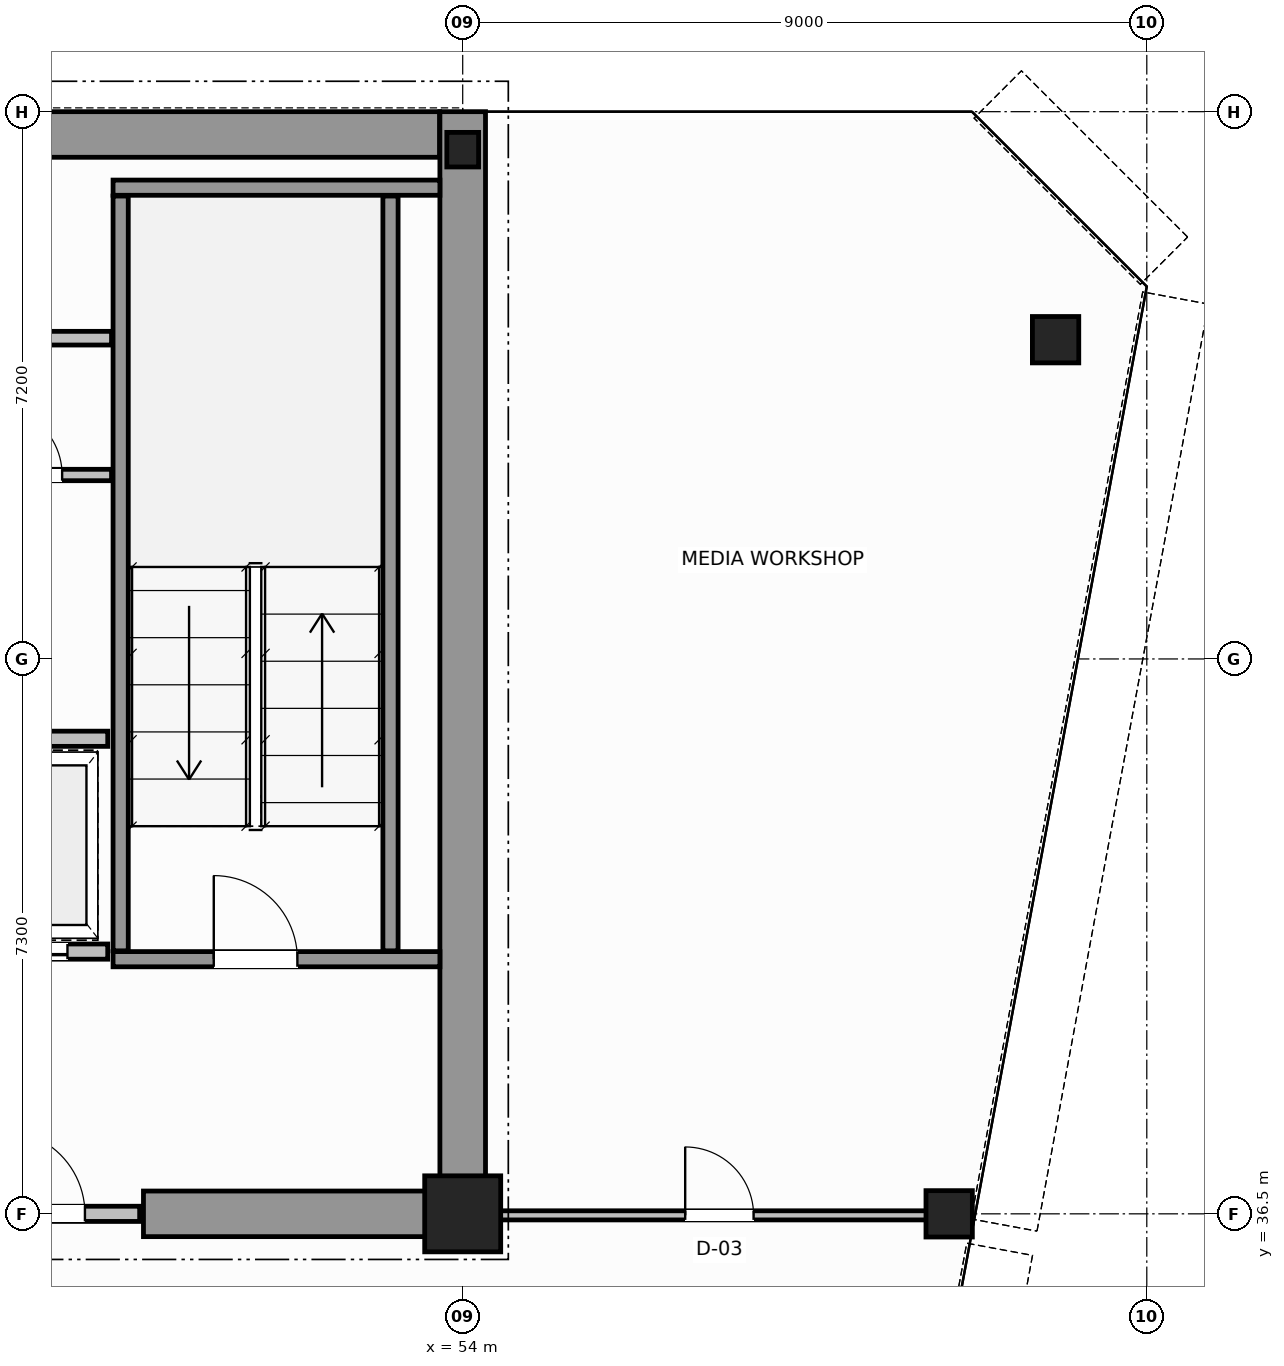
"""IFC4 building model, lengths in metres.
Left out: names, types, materials, properties, quantities, classifications, styles, units other than length and angle.
Written with IfcOpenShell. Run it as: python <this file> out.ifc"""

import sys

from ifc_helpers import new_model, si_unit, direction, frame, frame_2d, origin, origin_2d, place, context, subcontext, project, spatial, rectangle, hollow_circle, i_section, extrude, source, transform, mapped, element, fill, save


model = new_model("IFC4")
c1 = context("Model", 3, precision=1e-05, world=origin(), true_north=direction((0.0, 1.0)))
c2 = subcontext(c1, "Body", "Model", "MODEL_VIEW")
j1 = project(units=[si_unit("LENGTHUNIT", "METRE"), si_unit("PLANEANGLEUNIT", "RADIAN")], contexts=[c1])
p1 = place(None, origin())
s1 = spatial("IfcSite", under=j1, at=p1, CompositionType="ELEMENT")
p2 = place(p1, origin())
s2 = spatial("IfcBuilding", under=s1, at=p2, CompositionType="ELEMENT")
p3 = place(p2, frame((0.0, 0.0, 234.6)))
s3 = spatial("IfcBuildingStorey", under=s2, at=p3, CompositionType="ELEMENT", Elevation=234.6)
m1 = source(origin(), c2, "Body", "SweptSolid", [
    extrude(rectangle(XDim=1.0, YDim=1.0, at=origin_2d()), origin(), (0.0, 0.0, 1.0), 3.8),
])
p4 = place(p3, frame((54.0, 36.5, 0.0), z_axis=(0.0, 0.0, 1.0), x_axis=(1.0, 0.0, 0.0)))
e1 = element("IfcColumn", 1, at=p4, inside=s3, PredefinedType="COLUMN", context=c2, shape_type="MappedRepresentation", body=[
    mapped(m1, transform((0.0, 0.0, 0.0), scale=1.0)),
])
m2 = source(origin(), c2, "Body", "SweptSolid", [
    extrude(i_section(OverallWidth=0.418, OverallDepth=0.455, WebThickness=0.042, FlangeThickness=0.058, FilletRadius=0.015, at=origin_2d()), origin(), (0.0, 0.0, 1.0), 3.8),
])
p5 = place(p3, frame((54.0, 50.5, 0.0), z_axis=(0.0, 0.0, 1.0), x_axis=(1.0, 0.0, 0.0)))
e2 = element("IfcColumn", 2, at=p5, inside=s3, PredefinedType="COLUMN", context=c2, shape_type="MappedRepresentation", body=[
    mapped(m2, transform((0.0, 0.0, 0.0), scale=1.0)),
])
m3 = source(origin(), c2, "Body", "SweptSolid", [
    extrude(hollow_circle(Radius=0.305, WallThickness=0.03, at=origin_2d()), origin(), (0.0, 0.0, 1.0), 3.8),
])
for number, where, z_axis, x_axis in (
    (3, (61.8, 48.0, 0.0), (0.0, 0.0, 1.0), (1.0, 0.0, 0.0)),
    (4, (60.4, 36.5, 0.0), (0.0, 0.0, 1.0), (1.0, 0.0, 0.0)),
):
    element("IfcColumn", number, at=place(p3, frame(where, z_axis=z_axis, x_axis=x_axis)), inside=s3, PredefinedType="COLUMN", context=c2, shape_type="MappedRepresentation", body=[
        mapped(m3, transform((0.0, 0.0, 0.0), scale=1.0)),
    ])
p6 = place(p3, frame((34.002, 50.7, 0.0), z_axis=(0.0, 0.0, 1.0), x_axis=(1.0, 0.0, 0.0)))
e5 = element("IfcWall", 5, at=p6, inside=s3, PredefinedType="SHEAR", context=c2, shape_type="SweptSolid", body=[
    extrude(rectangle(XDim=19.694, YDim=0.6, at=frame_2d((9.847, 0.0))), origin(), (0.0, 0.0, 1.0), 3.8),
])
p7 = place(p3, frame((54.0, 36.5, 0.0), z_axis=(0.0, 0.0, 1.0), x_axis=(0.0, 1.0, 0.0)))
e6 = element("IfcWall", 6, at=p7, inside=s3, PredefinedType="SHEAR", context=c2, shape_type="SweptSolid", body=[
    extrude(rectangle(XDim=14.5, YDim=0.6, at=frame_2d((7.25, 0.0))), origin(), (0.0, 0.0, 1.0), 3.8),
])
p8 = place(p3, frame((49.8, 36.5, 0.0), z_axis=(0.0, 0.0, 1.0), x_axis=(1.0, 0.0, 0.0)))
e7 = element("IfcWall", 7, at=p8, inside=s3, PredefinedType="SHEAR", context=c2, shape_type="SweptSolid", body=[
    extrude(rectangle(XDim=3.88, YDim=0.6, at=frame_2d((1.94, 0.0))), origin(), (0.0, 0.0, 1.0), 2.58),
])
p9 = place(p3, frame((49.4, 39.85, 0.0), z_axis=(0.0, 0.0, 1.0), x_axis=(1.0, 0.0, 0.0)))
e8 = element("IfcWall", 8, at=p9, inside=s3, PredefinedType="SOLIDWALL", context=c2, shape_type="SweptSolid", body=[
    extrude(rectangle(XDim=4.3, YDim=0.2, at=frame_2d((2.15, 0.0))), origin(), (0.0, 0.0, 1.0), 3.8),
])
p10 = place(p9, frame((1.325, 0.0, 0.0)))
e9 = element("IfcOpeningElement", 9, at=p10, cuts=e8, PredefinedType="OPENING", context=c2, shape_type="SweptSolid", body=[
    extrude(rectangle(XDim=1.1, YDim=2.15, at=frame_2d((0.55, 1.075))), frame((0.0, 0.11, 0.0), z_axis=(0.0, -1.0, 0.0), x_axis=(1.0, 0.0, 0.0)), (0.0, 0.0, 1.0), 0.22),
])
p11 = place(p3, frame((49.4, 50.0, 0.0), z_axis=(0.0, 0.0, 1.0), x_axis=(1.0, 0.0, 0.0)))
e10 = element("IfcWall", 10, at=p11, inside=s3, PredefinedType="SOLIDWALL", context=c2, shape_type="SweptSolid", body=[
    extrude(rectangle(XDim=4.3, YDim=0.2, at=frame_2d((2.15, 0.0))), origin(), (0.0, 0.0, 1.0), 3.8),
])
for number, where, z_axis, x_axis in (
    (11, (49.5, 39.96, 0.0), (0.0, 0.0, 1.0), (0.0, 1.0, 0.0)),
    (12, (53.05, 39.96, 0.0), (0.0, 0.0, 1.0), (0.0, 1.0, 0.0)),
):
    element("IfcWall", number, at=place(p3, frame(where, z_axis=z_axis, x_axis=x_axis)), inside=s3, PredefinedType="SOLIDWALL", context=c2, shape_type="SweptSolid", body=[
        extrude(rectangle(XDim=9.93, YDim=0.2, at=frame_2d((4.965, 0.0))), origin(), (0.0, 0.0, 1.0), 3.8),
    ])
p12 = place(p3, frame((47.28, 36.5, 0.0), z_axis=(0.0, 0.0, 1.0), x_axis=(1.0, 0.0, 0.0)))
e13 = element("IfcWall", 13, at=p12, inside=s3, PredefinedType="SOLIDWALL", context=c2, shape_type="SweptSolid", body=[
    extrude(rectangle(XDim=2.47, YDim=0.2, at=frame_2d((1.235, 0.0))), origin(), (0.0, 0.0, 1.0), 2.57),
])
p13 = place(p12, frame((0.65, 0.0, 0.0)))
e14 = element("IfcOpeningElement", 14, at=p13, cuts=e13, PredefinedType="OPENING", context=c2, shape_type="SweptSolid", body=[
    extrude(rectangle(XDim=1.1, YDim=2.15, at=frame_2d((0.55, 1.075))), frame((0.0, 0.11, 0.0), z_axis=(0.0, -1.0, 0.0), x_axis=(1.0, 0.0, 0.0)), (0.0, 0.0, 1.0), 0.22),
])
p14 = place(p3, frame((47.17, 39.95, 0.0), z_axis=(0.0, 0.0, 1.0), x_axis=(1.0, 0.0, 0.0)))
e15 = element("IfcWall", 15, at=p14, inside=s3, PredefinedType="SOLIDWALL", context=c2, shape_type="SweptSolid", body=[
    extrude(rectangle(XDim=2.16, YDim=0.2, at=frame_2d((1.08, 0.0))), origin(), (0.0, 0.0, 1.0), 3.58),
])
p15 = place(p14, frame((0.53, 0.0, 0.0)))
e16 = element("IfcOpeningElement", 16, at=p15, cuts=e15, PredefinedType="OPENING", context=c2, shape_type="SweptSolid", body=[
    extrude(rectangle(XDim=1.1, YDim=2.15, at=frame_2d((0.55, 1.075))), frame((0.0, 0.11, 0.0), z_axis=(0.0, -1.0, 0.0), x_axis=(1.0, 0.0, 0.0)), (0.0, 0.0, 1.0), 0.22),
])
p16 = place(p3, frame((47.17, 42.75, 0.0), z_axis=(0.0, 0.0, 1.0), x_axis=(1.0, 0.0, 0.0)))
e17 = element("IfcWall", 17, at=p16, inside=s3, PredefinedType="SOLIDWALL", context=c2, shape_type="SweptSolid", body=[
    extrude(rectangle(XDim=2.16, YDim=0.2, at=frame_2d((1.08, 0.0))), origin(), (0.0, 0.0, 1.0), 3.58),
])
p17 = place(p3, frame((47.28, 46.22, 0.0), z_axis=(0.0, 0.0, 1.0), x_axis=(1.0, 0.0, 0.0)))
e18 = element("IfcWall", 18, at=p17, inside=s3, PredefinedType="PARTITIONING", context=c2, shape_type="SweptSolid", body=[
    extrude(rectangle(XDim=2.1, YDim=0.15, at=frame_2d((1.05, 0.0))), origin(), (0.0, 0.0, 1.0), 3.58),
])
p18 = place(p17, frame((0.55, 0.0, 0.0)))
e19 = element("IfcOpeningElement", 19, at=p18, cuts=e18, PredefinedType="OPENING", context=c2, shape_type="SweptSolid", body=[
    extrude(rectangle(XDim=0.9, YDim=2.1, at=frame_2d((0.45, 1.05))), frame((0.0, 0.085, 0.0), z_axis=(0.0, -1.0, 0.0), x_axis=(1.0, 0.0, 0.0)), (0.0, 0.0, 1.0), 0.17),
])
p19 = place(p3, frame((18.62, 48.02, 0.0), z_axis=(0.0, 0.0, 1.0), x_axis=(1.0, 0.0, 0.0)))
e20 = element("IfcWall", 20, at=p19, inside=s3, PredefinedType="PLUMBINGWALL", context=c2, shape_type="SweptSolid", body=[
    extrude(rectangle(XDim=30.76, YDim=0.18, at=frame_2d((15.38, 0.0))), origin(), (0.0, 0.0, 1.0), 3.58),
])
p20 = place(p19, frame((1.655, 0.0, 0.0)))
e21 = element("IfcOpeningElement", 21, at=p20, cuts=e20, PredefinedType="OPENING", context=c2, shape_type="SweptSolid", body=[
    extrude(rectangle(XDim=0.9, YDim=2.15, at=frame_2d((0.45, 1.075))), frame((0.0, 0.1, 0.0), z_axis=(0.0, -1.0, 0.0), x_axis=(1.0, 0.0, 0.0)), (0.0, 0.0, 1.0), 0.2),
])
p21 = place(p19, frame((6.03, 0.0, 0.0)))
e22 = element("IfcOpeningElement", 22, at=p21, cuts=e20, PredefinedType="OPENING", context=c2, shape_type="SweptSolid", body=[
    extrude(rectangle(XDim=0.9, YDim=2.15, at=frame_2d((0.45, 1.075))), frame((0.0, 0.1, 0.0), z_axis=(0.0, -1.0, 0.0), x_axis=(1.0, 0.0, 0.0)), (0.0, 0.0, 1.0), 0.2),
])
p22 = place(p19, frame((10.93, 0.0, 0.0)))
e23 = element("IfcOpeningElement", 23, at=p22, cuts=e20, PredefinedType="OPENING", context=c2, shape_type="SweptSolid", body=[
    extrude(rectangle(XDim=0.9, YDim=2.15, at=frame_2d((0.45, 1.075))), frame((0.0, 0.1, 0.0), z_axis=(0.0, -1.0, 0.0), x_axis=(1.0, 0.0, 0.0)), (0.0, 0.0, 1.0), 0.2),
])
p23 = place(p19, frame((16.13, 0.0, 0.0)))
e24 = element("IfcOpeningElement", 24, at=p23, cuts=e20, PredefinedType="OPENING", context=c2, shape_type="SweptSolid", body=[
    extrude(rectangle(XDim=0.9, YDim=2.15, at=frame_2d((0.45, 1.075))), frame((0.0, 0.1, 0.0), z_axis=(0.0, -1.0, 0.0), x_axis=(1.0, 0.0, 0.0)), (0.0, 0.0, 1.0), 0.2),
])
p24 = place(p19, frame((21.73, 0.0, 0.0)))
e25 = element("IfcOpeningElement", 25, at=p24, cuts=e20, PredefinedType="OPENING", context=c2, shape_type="SweptSolid", body=[
    extrude(rectangle(XDim=0.9, YDim=2.15, at=frame_2d((0.45, 1.075))), frame((0.0, 0.1, 0.0), z_axis=(0.0, -1.0, 0.0), x_axis=(1.0, 0.0, 0.0)), (0.0, 0.0, 1.0), 0.2),
])
p25 = place(p19, frame((27.505, 0.0, 0.0)))
e26 = element("IfcOpeningElement", 26, at=p25, cuts=e20, PredefinedType="OPENING", context=c2, shape_type="SweptSolid", body=[
    extrude(rectangle(XDim=0.9, YDim=2.15, at=frame_2d((0.45, 1.075))), frame((0.0, 0.1, 0.0), z_axis=(0.0, -1.0, 0.0), x_axis=(1.0, 0.0, 0.0)), (0.0, 0.0, 1.0), 0.2),
])
p26 = place(p3, frame((54.06, 36.48, 0.0), z_axis=(0.0, 0.0, 1.0), x_axis=(1.0, 0.0, 0.0)))
e27 = element("IfcWall", 27, at=p26, inside=s3, PredefinedType="PARTITIONING", context=c2, shape_type="SweptSolid", body=[
    extrude(rectangle(XDim=6.634, YDim=0.12, at=frame_2d((3.317, 0.0))), origin(), (0.0, 0.0, 1.0), 2.37),
])
p27 = place(p26, frame((2.867, 0.0, 0.0)))
e28 = element("IfcOpeningElement", 28, at=p27, cuts=e27, PredefinedType="OPENING", context=c2, shape_type="SweptSolid", body=[
    extrude(rectangle(XDim=0.9, YDim=2.15, at=frame_2d((0.45, 1.075))), frame((0.0, 0.07, 0.0), z_axis=(0.0, -1.0, 0.0), x_axis=(1.0, 0.0, 0.0)), (0.0, 0.0, 1.0), 0.14),
])
m4 = source(origin(), c2, "Body", "SweptSolid", [
    extrude(rectangle(XDim=1.1, YDim=2.15, at=frame_2d((0.55, 1.075))), frame((0.0, 0.025, 0.0), z_axis=(0.0, -1.0, 0.0), x_axis=(1.0, 0.0, 0.0)), (0.0, 0.0, 1.0), 0.05),
])
p28 = place(p10, origin())
e29 = element("IfcDoor", 29, at=p28, inside=s3, OperationType="SINGLE_SWING_RIGHT", PredefinedType="DOOR", context=c2, shape_type="MappedRepresentation", body=[
    mapped(m4, transform((0.0, 0.0, 0.0), scale=1.0)),
])
fill(e9, e29)
p29 = place(p13, origin())
e30 = element("IfcDoor", 30, at=p29, inside=s3, OperationType="SINGLE_SWING_LEFT", PredefinedType="DOOR", context=c2, shape_type="MappedRepresentation", body=[
    mapped(m4, transform((0.0, 0.0, 0.0), scale=1.0)),
])
fill(e14, e30)
p30 = place(p15, origin())
e31 = element("IfcDoor", 31, at=p30, inside=s3, OperationType="DOUBLE_DOOR_SLIDING", PredefinedType="DOOR", context=c2, shape_type="MappedRepresentation", body=[
    mapped(m4, transform((0.0, 0.0, 0.0), scale=1.0)),
])
fill(e16, e31)
m5 = source(origin(), c2, "Body", "SweptSolid", [
    extrude(rectangle(XDim=0.9, YDim=2.1, at=frame_2d((0.45, 1.05))), frame((0.0, 0.025, 0.0), z_axis=(0.0, -1.0, 0.0), x_axis=(1.0, 0.0, 0.0)), (0.0, 0.0, 1.0), 0.05),
])
p31 = place(p18, origin())
e32 = element("IfcDoor", 32, at=p31, inside=s3, OperationType="SINGLE_SWING_RIGHT", PredefinedType="DOOR", context=c2, shape_type="MappedRepresentation", body=[
    mapped(m5, transform((0.0, 0.0, 0.0), scale=1.0)),
])
fill(e19, e32)
m6 = source(origin(), c2, "Body", "SweptSolid", [
    extrude(rectangle(XDim=0.9, YDim=2.15, at=frame_2d((0.45, 1.075))), frame((0.0, 0.025, 0.0), z_axis=(0.0, -1.0, 0.0), x_axis=(1.0, 0.0, 0.0)), (0.0, 0.0, 1.0), 0.05),
])
p32 = place(p27, origin())
e33 = element("IfcDoor", 33, at=p32, inside=s3, OperationType="SINGLE_SWING_RIGHT", PredefinedType="DOOR", context=c2, shape_type="MappedRepresentation", body=[
    mapped(m6, transform((0.0, 0.0, 0.0), scale=1.0)),
])
fill(e28, e33)
save(model, sys.argv[1])
